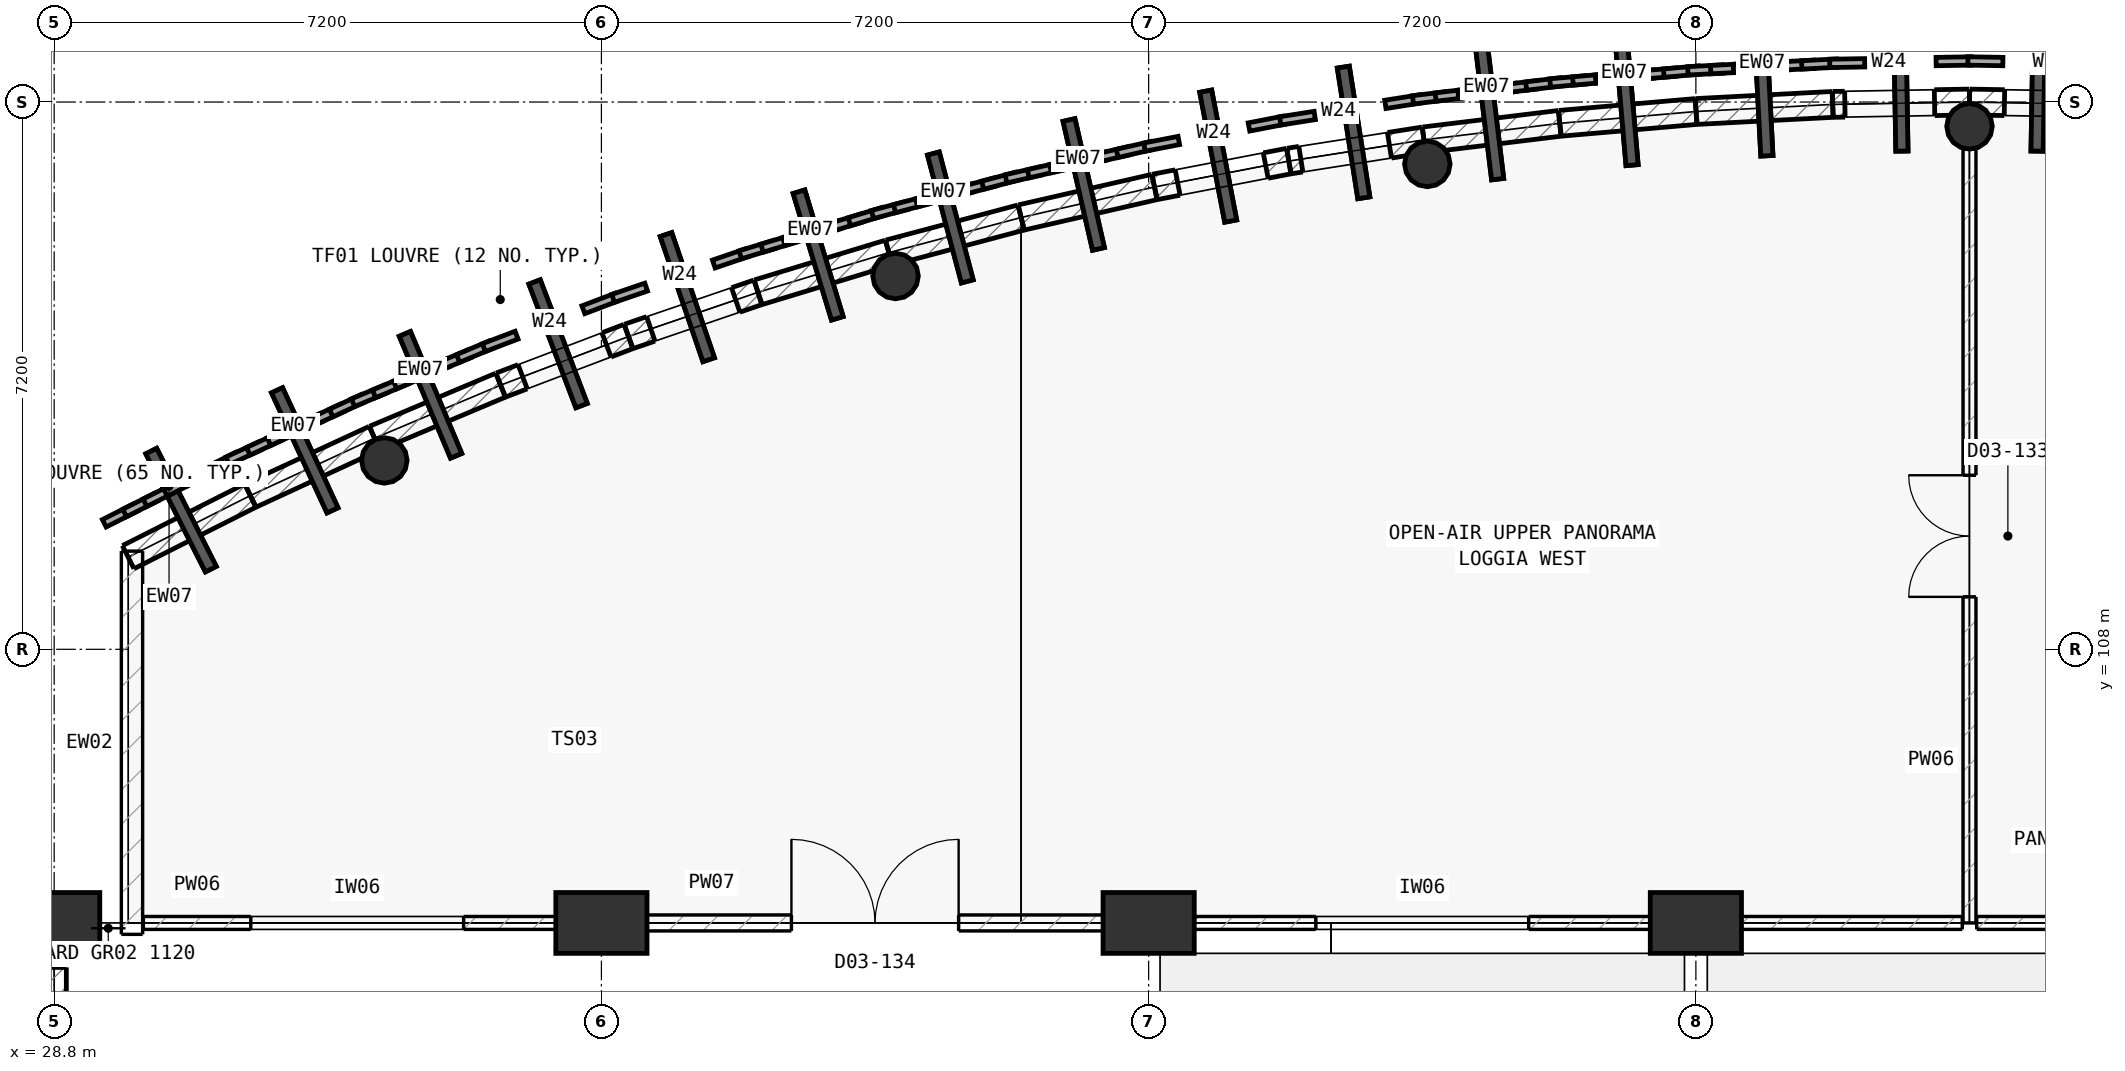
"""IFC4 building model, lengths in metres.
Left out: names, types, materials, properties, quantities, classifications, styles, units other than length and angle.
Written with IfcOpenShell. Run it as: python <this file> out.ifc"""

import sys

from ifc_helpers import new_model, si_unit, direction, frame, frame_2d, origin, origin_2d, place, context, subcontext, project, spatial, polyline, rectangle, circle, outline, extrude, element, fill, save


model = new_model("IFC4")
c1 = context("Model", 3, precision=1e-05, world=origin(), true_north=direction((0.0, 1.0)))
c2 = subcontext(c1, "Body", "Model", "MODEL_VIEW")
j1 = project(units=[si_unit("LENGTHUNIT", "METRE"), si_unit("PLANEANGLEUNIT", "RADIAN")], contexts=[c1])
p1 = place(None, origin())
s1 = spatial("IfcSite", under=j1, at=p1, CompositionType="ELEMENT")
p2 = place(p1, origin())
s2 = spatial("IfcBuilding", under=s1, at=p2, CompositionType="ELEMENT")
p3 = place(p2, frame((0.0, 0.0, 16.0)))
s3 = spatial("IfcBuildingStorey", under=s2, at=p3, CompositionType="ELEMENT", Elevation=16.0)
p4 = place(p3, frame((28.8, 104.4, 0.0), z_axis=(0.0, 0.0, 1.0), x_axis=(1.0, 0.0, 0.0)))
e1 = element("IfcColumn", 1, at=p4, inside=s3, PredefinedType="COLUMN", context=c2, shape_type="SweptSolid", body=[
    extrude(rectangle(XDim=0.8, YDim=1.2, at=origin_2d()), origin(), (0.0, 0.0, 1.0), 4.8),
])
p5 = place(p3, frame((33.144, 110.485, 0.0), z_axis=(0.0, 0.0, 1.0), x_axis=(1.0, 0.0, 0.0)))
e2 = element("IfcColumn", 2, at=p5, inside=s3, PredefinedType="COLUMN", context=c2, shape_type="SweptSolid", body=[
    extrude(circle(Radius=0.3, at=origin_2d()), origin(), (0.0, 0.0, 1.0), 4.17),
])
p6 = place(p3, frame((36.0, 104.4, 0.0), z_axis=(0.0, 0.0, 1.0), x_axis=(1.0, 0.0, 0.0)))
e3 = element("IfcColumn", 3, at=p6, inside=s3, PredefinedType="COLUMN", context=c2, shape_type="SweptSolid", body=[
    extrude(rectangle(XDim=0.8, YDim=1.2, at=origin_2d()), origin(), (0.0, 0.0, 1.0), 4.8),
])
p7 = place(p3, frame((39.87, 112.911, 0.0), z_axis=(0.0, 0.0, 1.0), x_axis=(1.0, 0.0, 0.0)))
e4 = element("IfcColumn", 4, at=p7, inside=s3, PredefinedType="COLUMN", context=c2, shape_type="SweptSolid", body=[
    extrude(circle(Radius=0.3, at=origin_2d()), origin(), (0.0, 0.0, 1.0), 4.17),
])
p8 = place(p3, frame((43.2, 104.4, 0.0), z_axis=(0.0, 0.0, 1.0), x_axis=(1.0, 0.0, 0.0)))
e5 = element("IfcColumn", 5, at=p8, inside=s3, PredefinedType="COLUMN", context=c2, shape_type="SweptSolid", body=[
    extrude(rectangle(XDim=0.8, YDim=1.2, at=origin_2d()), origin(), (0.0, 0.0, 1.0), 4.8),
])
p9 = place(p3, frame((46.867, 114.385, 0.0), z_axis=(0.0, 0.0, 1.0), x_axis=(1.0, 0.0, 0.0)))
e6 = element("IfcColumn", 6, at=p9, inside=s3, PredefinedType="COLUMN", context=c2, shape_type="SweptSolid", body=[
    extrude(circle(Radius=0.3, at=origin_2d()), origin(), (0.0, 0.0, 1.0), 4.17),
])
p10 = place(p3, frame((50.4, 104.4, 0.0), z_axis=(0.0, 0.0, 1.0), x_axis=(1.0, 0.0, 0.0)))
e7 = element("IfcColumn", 7, at=p10, inside=s3, PredefinedType="COLUMN", context=c2, shape_type="SweptSolid", body=[
    extrude(rectangle(XDim=0.8, YDim=1.2, at=origin_2d()), origin(), (0.0, 0.0, 1.0), 4.8),
])
p11 = place(p3, frame((54.0, 114.88, 0.0), z_axis=(0.0, 0.0, 1.0), x_axis=(1.0, 0.0, 0.0)))
e8 = element("IfcColumn", 8, at=p11, inside=s3, PredefinedType="COLUMN", context=c2, shape_type="SweptSolid", body=[
    extrude(circle(Radius=0.3, at=origin_2d()), origin(), (0.0, 0.0, 1.0), 4.17),
])
for number, where, z_axis, x_axis in (
    (9, (29.774, 109.212, 0.0), (0.0, 0.0, 1.0), (0.893, 0.45, 0.0)),
    (10, (31.381, 110.023, 0.0), (0.0, 0.0, 1.0), (0.908, 0.419, 0.0)),
):
    element("IfcWall", number, at=place(p3, frame(where, z_axis=z_axis, x_axis=x_axis)), inside=s3, PredefinedType="SOLIDWALL", context=c2, shape_type="SweptSolid", body=[
        extrude(outline(polyline([(0.003, -0.17), (1.797, -0.17), (1.803, 0.17), (-0.003, 0.17), (0.003, -0.17)])), origin(), (0.0, 0.0, 1.0), 4.4),
    ])
p12 = place(p3, frame((33.015, 110.778, 0.0), z_axis=(0.0, 0.0, 1.0), x_axis=(0.921803799964, 0.387656748131, 0.0)))
e11 = element("IfcWall", 11, at=p12, inside=s3, PredefinedType="SOLIDWALL", context=c2, shape_type="SweptSolid", body=[
    extrude(outline(polyline([(0.003, -0.17), (1.797, -0.17), (1.803, 0.17), (-0.003, 0.17), (0.003, -0.17)])), origin(), (0.0, 0.0, 1.0), 4.4),
])
p13 = place(p3, frame((34.674, 111.475, 0.0), z_axis=(0.0, 0.0, 1.0), x_axis=(0.934674543416, 0.35550456803, 0.0)))
e12 = element("IfcWall", 12, at=p13, inside=s3, PredefinedType="SOLIDWALL", context=c2, shape_type="SweptSolid", body=[
    extrude(outline(polyline([(0.003, -0.17), (1.797, -0.17), (1.803, 0.17), (-0.003, 0.17), (0.003, -0.17)])), origin(), (0.0, 0.0, 1.0), 4.4),
])
p14 = place(p13, frame((0.31, 0.0, 0.55)))
e13 = element("IfcOpeningElement", 13, at=p14, cuts=e12, PredefinedType="OPENING", context=c2, shape_type="SweptSolid", body=[
    extrude(rectangle(XDim=1.18, YDim=3.4, at=frame_2d((0.59, 1.7))), frame((0.0, 0.18, 0.0), z_axis=(0.0, -1.0, 0.0), x_axis=(1.0, 0.0, 0.0)), (0.0, 0.0, 1.0), 0.36),
])
p15 = place(p3, frame((36.356, 112.115, 0.0), z_axis=(0.0, 0.0, 1.0), x_axis=(0.946421657721, 0.322933500578, 0.0)))
e14 = element("IfcWall", 14, at=p15, inside=s3, PredefinedType="SOLIDWALL", context=c2, shape_type="SweptSolid", body=[
    extrude(outline(polyline([(0.003, -0.17), (1.797, -0.17), (1.803, 0.17), (-0.003, 0.17), (0.003, -0.17)])), origin(), (0.0, 0.0, 1.0), 4.4),
])
p16 = place(p15, frame((0.31, 0.0, 0.55)))
e15 = element("IfcOpeningElement", 15, at=p16, cuts=e14, PredefinedType="OPENING", context=c2, shape_type="SweptSolid", body=[
    extrude(rectangle(XDim=1.18, YDim=3.4, at=frame_2d((0.59, 1.7))), frame((0.0, 0.18, 0.0), z_axis=(0.0, -1.0, 0.0), x_axis=(1.0, 0.0, 0.0)), (0.0, 0.0, 1.0), 0.36),
])
p17 = place(p3, frame((38.06, 112.697, 0.0), z_axis=(0.0, 0.0, 1.0), x_axis=(0.956993600338, 0.290109029354, 0.0)))
e16 = element("IfcWall", 16, at=p17, inside=s3, PredefinedType="SOLIDWALL", context=c2, shape_type="SweptSolid", body=[
    extrude(outline(polyline([(0.003, -0.17), (1.797, -0.17), (1.803, 0.17), (-0.003, 0.17), (0.003, -0.17)])), origin(), (0.0, 0.0, 1.0), 4.4),
])
p18 = place(p3, frame((39.783, 113.219, 0.0), z_axis=(0.0, 0.0, 1.0), x_axis=(0.966504582235, 0.256649357135, 0.0)))
e17 = element("IfcWall", 17, at=p18, inside=s3, PredefinedType="SOLIDWALL", context=c2, shape_type="SweptSolid", body=[
    extrude(outline(polyline([(0.003, -0.17), (1.797, -0.17), (1.803, 0.17), (-0.003, 0.17), (0.003, -0.17)])), origin(), (0.0, 0.0, 1.0), 4.4),
])
p19 = place(p3, frame((41.522, 113.681, 0.0), z_axis=(0.0, 0.0, 1.0), x_axis=(0.974791962114, 0.223115733641, 0.0)))
e18 = element("IfcWall", 18, at=p19, inside=s3, PredefinedType="SOLIDWALL", context=c2, shape_type="SweptSolid", body=[
    extrude(outline(polyline([(0.003, -0.17), (1.797, -0.17), (1.803, 0.17), (-0.003, 0.17), (0.003, -0.17)])), origin(), (0.0, 0.0, 1.0), 4.4),
])
p20 = place(p3, frame((43.277, 114.082, 0.0), z_axis=(0.0, 0.0, 1.0), x_axis=(0.981913462005, 0.189330275271, 0.0)))
e19 = element("IfcWall", 19, at=p20, inside=s3, PredefinedType="SOLIDWALL", context=c2, shape_type="SweptSolid", body=[
    extrude(outline(polyline([(0.003, -0.17), (1.797, -0.17), (1.803, 0.17), (-0.003, 0.17), (0.003, -0.17)])), origin(), (0.0, 0.0, 1.0), 4.4),
])
p21 = place(p20, frame((0.31, 0.0, 0.55)))
e20 = element("IfcOpeningElement", 20, at=p21, cuts=e19, PredefinedType="OPENING", context=c2, shape_type="SweptSolid", body=[
    extrude(rectangle(XDim=1.18, YDim=3.4, at=frame_2d((0.59, 1.7))), frame((0.0, 0.18, 0.0), z_axis=(0.0, -1.0, 0.0), x_axis=(1.0, 0.0, 0.0)), (0.0, 0.0, 1.0), 0.36),
])
p22 = place(p3, frame((45.044, 114.423, 0.0), z_axis=(0.0, 0.0, 1.0), x_axis=(0.987886929918, 0.155175428783, 0.0)))
e21 = element("IfcWall", 21, at=p22, inside=s3, PredefinedType="SOLIDWALL", context=c2, shape_type="SweptSolid", body=[
    extrude(outline(polyline([(0.003, -0.17), (1.797, -0.17), (1.803, 0.17), (-0.003, 0.17), (0.003, -0.17)])), origin(), (0.0, 0.0, 1.0), 4.4),
])
p23 = place(p22, frame((0.16, 0.0, 0.55)))
e22 = element("IfcOpeningElement", 22, at=p23, cuts=e21, PredefinedType="OPENING", context=c2, shape_type="SweptSolid", body=[
    extrude(rectangle(XDim=1.18, YDim=3.4, at=frame_2d((0.59, 1.7))), frame((0.0, 0.18, 0.0), z_axis=(0.0, -1.0, 0.0), x_axis=(1.0, 0.0, 0.0)), (0.0, 0.0, 1.0), 0.36),
])
p24 = place(p3, frame((46.823, 114.702, 0.0), z_axis=(0.0, 0.0, 1.0), x_axis=(0.992671296073, 0.120845761006, 0.0)))
e23 = element("IfcWall", 23, at=p24, inside=s3, PredefinedType="SOLIDWALL", context=c2, shape_type="SweptSolid", body=[
    extrude(outline(polyline([(0.003, -0.17), (1.797, -0.17), (1.803, 0.17), (-0.003, 0.17), (0.003, -0.17)])), origin(), (0.0, 0.0, 1.0), 4.4),
])
p25 = place(p3, frame((48.609, 114.92, 0.0), z_axis=(0.0, 0.0, 1.0), x_axis=(0.996260411494, 0.086401345422, 0.0)))
e24 = element("IfcWall", 24, at=p25, inside=s3, PredefinedType="SOLIDWALL", context=c2, shape_type="SweptSolid", body=[
    extrude(outline(polyline([(0.003, -0.17), (1.797, -0.17), (1.803, 0.17), (-0.003, 0.17), (0.003, -0.17)])), origin(), (0.0, 0.0, 1.0), 4.4),
])
p26 = place(p3, frame((50.403, 115.075, 0.0), z_axis=(0.0, 0.0, 1.0), x_axis=(0.998649863362, 0.051946611119, 0.0)))
e25 = element("IfcWall", 25, at=p26, inside=s3, PredefinedType="SOLIDWALL", context=c2, shape_type="SweptSolid", body=[
    extrude(outline(polyline([(0.003, -0.17), (1.797, -0.17), (1.803, 0.17), (-0.003, 0.17), (0.003, -0.17)])), origin(), (0.0, 0.0, 1.0), 4.4),
])
p27 = place(p3, frame((52.2, 115.169, 0.0), z_axis=(0.0, 0.0, 1.0), x_axis=(0.999851642284, 0.017224790907, 0.0)))
e26 = element("IfcWall", 26, at=p27, inside=s3, PredefinedType="SOLIDWALL", context=c2, shape_type="SweptSolid", body=[
    extrude(outline(polyline([(0.003, -0.17), (1.797, -0.17), (1.803, 0.17), (-0.003, 0.17), (0.003, -0.17)])), origin(), (0.0, 0.0, 1.0), 4.4),
])
p28 = place(p27, frame((0.16, 0.0, 0.55)))
e27 = element("IfcOpeningElement", 27, at=p28, cuts=e26, PredefinedType="OPENING", context=c2, shape_type="SweptSolid", body=[
    extrude(rectangle(XDim=1.18, YDim=3.4, at=frame_2d((0.59, 1.7))), frame((0.0, 0.18, 0.0), z_axis=(0.0, -1.0, 0.0), x_axis=(1.0, 0.0, 0.0)), (0.0, 0.0, 1.0), 0.36),
])
p29 = place(p3, frame((54.0, 115.2, 0.0), z_axis=(0.0, 0.0, 1.0), x_axis=(0.999851642284, -0.017224790907, 0.0)))
e28 = element("IfcWall", 28, at=p29, inside=s3, PredefinedType="SOLIDWALL", context=c2, shape_type="SweptSolid", body=[
    extrude(outline(polyline([(0.003, -0.17), (1.797, -0.17), (1.803, 0.17), (-0.003, 0.17), (0.003, -0.17)])), origin(), (0.0, 0.0, 1.0), 4.4),
])
p30 = place(p29, frame((0.46, 0.0, 0.55)))
e29 = element("IfcOpeningElement", 29, at=p30, cuts=e28, PredefinedType="OPENING", context=c2, shape_type="SweptSolid", body=[
    extrude(rectangle(XDim=1.18, YDim=3.4, at=frame_2d((0.59, 1.7))), frame((0.0, 0.18, 0.0), z_axis=(0.0, -1.0, 0.0), x_axis=(1.0, 0.0, 0.0)), (0.0, 0.0, 1.0), 0.36),
])
p31 = place(p3, frame((29.824, 104.25, 0.0), z_axis=(0.0, 0.0, 1.0), x_axis=(0.0, 1.0, 0.0)))
e30 = element("IfcWall", 30, at=p31, inside=s3, PredefinedType="SOLIDWALL", context=c2, shape_type="SweptSolid", body=[
    extrude(rectangle(XDim=5.042, YDim=0.28, at=frame_2d((2.521, 0.0))), origin(), (0.0, 0.0, 1.0), 4.12),
])
p32 = place(p3, frame((28.8, 94.035, 0.0), z_axis=(0.0, 0.0, 1.0), x_axis=(0.0, 1.0, 0.0)))
e31 = element("IfcWall", 31, at=p32, inside=s3, PredefinedType="SOLIDWALL", context=c2, shape_type="SweptSolid", body=[
    extrude(rectangle(XDim=9.78, YDim=0.32, at=frame_2d((4.89, 0.0))), origin(), (0.0, 0.0, 1.0), 4.4),
])
p33 = place(p32, frame((3.29, 0.0, 2.15)))
e32 = element("IfcOpeningElement", 32, at=p33, cuts=e31, PredefinedType="OPENING", context=c2, shape_type="SweptSolid", body=[
    extrude(rectangle(XDim=3.2, YDim=1.2, at=frame_2d((1.6, 0.6))), frame((0.0, 0.17, 0.0), z_axis=(0.0, -1.0, 0.0), x_axis=(1.0, 0.0, 0.0)), (0.0, 0.0, 1.0), 0.34),
])
p34 = place(p3, frame((54.0, 104.4, 0.0), z_axis=(0.0, 0.0, 1.0), x_axis=(0.0, 1.0, 0.0)))
e33 = element("IfcWall", 33, at=p34, inside=s3, PredefinedType="PARTITIONING", context=c2, shape_type="SweptSolid", body=[
    extrude(rectangle(XDim=10.18, YDim=0.17, at=frame_2d((5.09, 0.0))), origin(), (0.0, 0.0, 1.0), 4.12),
])
p35 = place(p34, frame((4.29, 0.0, 0.0)))
e34 = element("IfcOpeningElement", 34, at=p35, cuts=e33, PredefinedType="OPENING", context=c2, shape_type="SweptSolid", body=[
    extrude(rectangle(XDim=1.6, YDim=2.2, at=frame_2d((0.8, 1.1))), frame((0.0, 0.095, 0.0), z_axis=(0.0, -1.0, 0.0), x_axis=(1.0, 0.0, 0.0)), (0.0, 0.0, 1.0), 0.19),
])
p36 = place(p3, frame((29.974, 104.4, 0.0), z_axis=(0.0, 0.0, 1.0), x_axis=(1.0, 0.0, 0.0)))
e35 = element("IfcWall", 35, at=p36, inside=s3, PredefinedType="PARTITIONING", context=c2, shape_type="SweptSolid", body=[
    extrude(rectangle(XDim=5.626, YDim=0.17, at=frame_2d((2.813, 0.0))), origin(), (0.0, 0.0, 1.0), 3.78),
])
p37 = place(p36, frame((1.413, 0.0, 0.95)))
e36 = element("IfcOpeningElement", 36, at=p37, cuts=e35, PredefinedType="OPENING", context=c2, shape_type="SweptSolid", body=[
    extrude(rectangle(XDim=2.8, YDim=1.9, at=frame_2d((1.4, 0.95))), frame((0.0, 0.095, 0.0), z_axis=(0.0, -1.0, 0.0), x_axis=(1.0, 0.0, 0.0)), (0.0, 0.0, 1.0), 0.19),
])
p38 = place(p3, frame((36.4, 104.4, 0.0), z_axis=(0.0, 0.0, 1.0), x_axis=(1.0, 0.0, 0.0)))
e37 = element("IfcWall", 37, at=p38, inside=s3, PredefinedType="PARTITIONING", context=c2, shape_type="SweptSolid", body=[
    extrude(rectangle(XDim=6.4, YDim=0.21, at=frame_2d((3.2, 0.0))), origin(), (0.0, 0.0, 1.0), 3.78),
])
p39 = place(p38, frame((2.1, 0.0, 0.0)))
e38 = element("IfcOpeningElement", 38, at=p39, cuts=e37, PredefinedType="OPENING", context=c2, shape_type="SweptSolid", body=[
    extrude(rectangle(XDim=2.2, YDim=2.5, at=frame_2d((1.1, 1.25))), frame((0.0, 0.115, 0.0), z_axis=(0.0, -1.0, 0.0), x_axis=(1.0, 0.0, 0.0)), (0.0, 0.0, 1.0), 0.23),
])
p40 = place(p3, frame((43.6, 104.4, 0.0), z_axis=(0.0, 0.0, 1.0), x_axis=(1.0, 0.0, 0.0)))
e39 = element("IfcWall", 39, at=p40, inside=s3, PredefinedType="PARTITIONING", context=c2, shape_type="SweptSolid", body=[
    extrude(rectangle(XDim=6.4, YDim=0.17, at=frame_2d((3.2, 0.0))), origin(), (0.0, 0.0, 1.0), 3.78),
])
p41 = place(p40, frame((1.8, 0.0, 0.95)))
e40 = element("IfcOpeningElement", 40, at=p41, cuts=e39, PredefinedType="OPENING", context=c2, shape_type="SweptSolid", body=[
    extrude(rectangle(XDim=2.8, YDim=1.9, at=frame_2d((1.4, 0.95))), frame((0.0, 0.095, 0.0), z_axis=(0.0, -1.0, 0.0), x_axis=(1.0, 0.0, 0.0)), (0.0, 0.0, 1.0), 0.19),
])
for number, where, z_axis, x_axis in (
    (41, (50.8, 104.4, 0.0), (0.0, 0.0, 1.0), (1.0, 0.0, 0.0)),
    (42, (54.095, 104.4, 0.0), (0.0, 0.0, 1.0), (1.0, 0.0, 0.0)),
):
    element("IfcWall", number, at=place(p3, frame(where, z_axis=z_axis, x_axis=x_axis)), inside=s3, PredefinedType="PARTITIONING", context=c2, shape_type="SweptSolid", body=[
        extrude(rectangle(XDim=3.105, YDim=0.17, at=frame_2d((1.552, 0.0))), origin(), (0.0, 0.0, 1.0), 3.78),
    ])
p42 = place(p14, origin())
e43 = element("IfcWindow", 43, at=p42, inside=s3, PartitioningType="SINGLE_PANEL", PredefinedType="WINDOW", context=c2, shape_type="SweptSolid", body=[
    extrude(rectangle(XDim=1.18, YDim=3.4, at=frame_2d((0.59, 1.7))), frame((0.0, 0.03, 0.0), z_axis=(0.0, -1.0, 0.0), x_axis=(1.0, 0.0, 0.0)), (0.0, 0.0, 1.0), 0.06),
])
fill(e13, e43)
p43 = place(p16, origin())
e44 = element("IfcWindow", 44, at=p43, inside=s3, PartitioningType="SINGLE_PANEL", PredefinedType="WINDOW", context=c2, shape_type="SweptSolid", body=[
    extrude(rectangle(XDim=1.18, YDim=3.4, at=frame_2d((0.59, 1.7))), frame((0.0, 0.03, 0.0), z_axis=(0.0, -1.0, 0.0), x_axis=(1.0, 0.0, 0.0)), (0.0, 0.0, 1.0), 0.06),
])
fill(e15, e44)
p44 = place(p21, origin())
e45 = element("IfcWindow", 45, at=p44, inside=s3, PartitioningType="SINGLE_PANEL", PredefinedType="WINDOW", context=c2, shape_type="SweptSolid", body=[
    extrude(rectangle(XDim=1.18, YDim=3.4, at=frame_2d((0.59, 1.7))), frame((0.0, 0.03, 0.0), z_axis=(0.0, -1.0, 0.0), x_axis=(1.0, 0.0, 0.0)), (0.0, 0.0, 1.0), 0.06),
])
fill(e20, e45)
p45 = place(p23, origin())
e46 = element("IfcWindow", 46, at=p45, inside=s3, PartitioningType="SINGLE_PANEL", PredefinedType="WINDOW", context=c2, shape_type="SweptSolid", body=[
    extrude(rectangle(XDim=1.18, YDim=3.4, at=frame_2d((0.59, 1.7))), frame((0.0, 0.03, 0.0), z_axis=(0.0, -1.0, 0.0), x_axis=(1.0, 0.0, 0.0)), (0.0, 0.0, 1.0), 0.06),
])
fill(e22, e46)
p46 = place(p28, origin())
e47 = element("IfcWindow", 47, at=p46, inside=s3, PartitioningType="SINGLE_PANEL", PredefinedType="WINDOW", context=c2, shape_type="SweptSolid", body=[
    extrude(rectangle(XDim=1.18, YDim=3.4, at=frame_2d((0.59, 1.7))), frame((0.0, 0.03, 0.0), z_axis=(0.0, -1.0, 0.0), x_axis=(1.0, 0.0, 0.0)), (0.0, 0.0, 1.0), 0.06),
])
fill(e27, e47)
p47 = place(p30, origin())
e48 = element("IfcWindow", 48, at=p47, inside=s3, PartitioningType="SINGLE_PANEL", PredefinedType="WINDOW", context=c2, shape_type="SweptSolid", body=[
    extrude(rectangle(XDim=1.18, YDim=3.4, at=frame_2d((0.59, 1.7))), frame((0.0, 0.03, 0.0), z_axis=(0.0, -1.0, 0.0), x_axis=(1.0, 0.0, 0.0)), (0.0, 0.0, 1.0), 0.06),
])
fill(e29, e48)
p48 = place(p35, origin())
e49 = element("IfcDoor", 49, at=p48, inside=s3, OperationType="DOUBLE_DOOR_SINGLE_SWING", PredefinedType="DOOR", context=c2, shape_type="SweptSolid", body=[
    extrude(rectangle(XDim=1.6, YDim=2.2, at=frame_2d((0.8, 1.1))), frame((0.0, 0.025, 0.0), z_axis=(0.0, -1.0, 0.0), x_axis=(1.0, 0.0, 0.0)), (0.0, 0.0, 1.0), 0.05),
])
fill(e34, e49)
p49 = place(p37, origin())
e50 = element("IfcWindow", 50, at=p49, inside=s3, PartitioningType="SINGLE_PANEL", PredefinedType="WINDOW", context=c2, shape_type="SweptSolid", body=[
    extrude(rectangle(XDim=2.8, YDim=1.9, at=frame_2d((1.4, 0.95))), frame((0.0, 0.03, 0.0), z_axis=(0.0, -1.0, 0.0), x_axis=(1.0, 0.0, 0.0)), (0.0, 0.0, 1.0), 0.06),
])
fill(e36, e50)
p50 = place(p39, origin())
e51 = element("IfcDoor", 51, at=p50, inside=s3, OperationType="DOUBLE_DOOR_SINGLE_SWING", PredefinedType="DOOR", context=c2, shape_type="SweptSolid", body=[
    extrude(rectangle(XDim=2.2, YDim=2.5, at=frame_2d((1.1, 1.25))), frame((0.0, 0.025, 0.0), z_axis=(0.0, -1.0, 0.0), x_axis=(1.0, 0.0, 0.0)), (0.0, 0.0, 1.0), 0.05),
])
fill(e38, e51)
p51 = place(p41, origin())
e52 = element("IfcWindow", 52, at=p51, inside=s3, PartitioningType="SINGLE_PANEL", PredefinedType="WINDOW", context=c2, shape_type="SweptSolid", body=[
    extrude(rectangle(XDim=2.8, YDim=1.9, at=frame_2d((1.4, 0.95))), frame((0.0, 0.03, 0.0), z_axis=(0.0, -1.0, 0.0), x_axis=(1.0, 0.0, 0.0)), (0.0, 0.0, 1.0), 0.06),
])
fill(e40, e52)
save(model, sys.argv[1])
